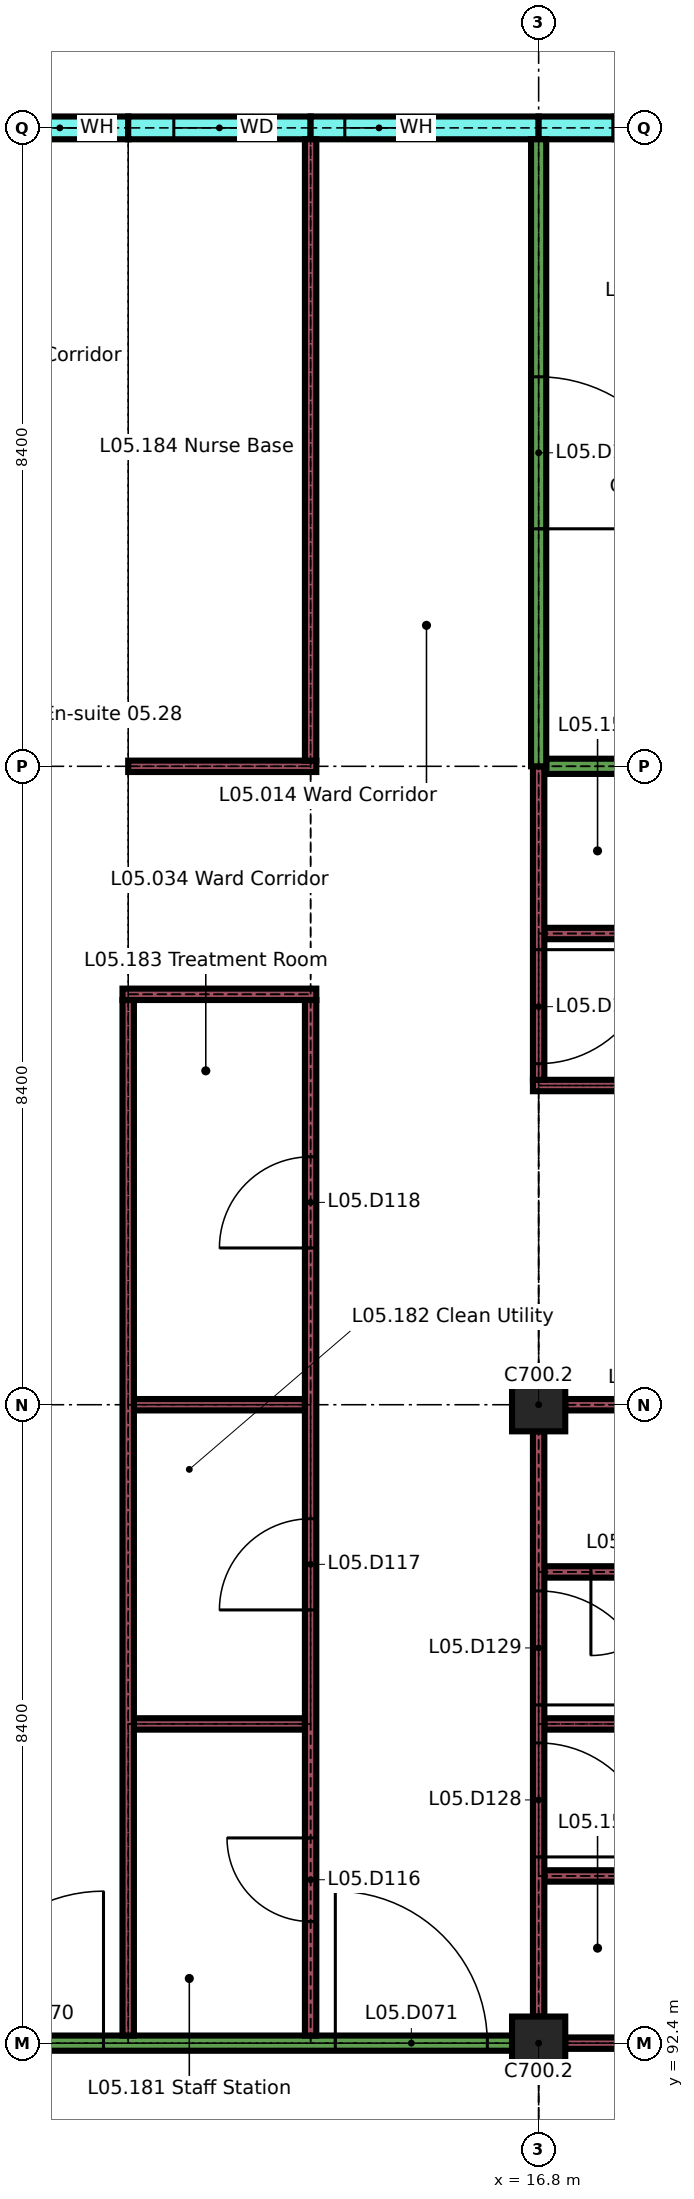
"""IFC4 building model, lengths in metres.
Left out: names, types, materials, properties, quantities, classifications, styles, units other than length and angle.
Written with IfcOpenShell. Run it as: python <this file> out.ifc"""

import sys

from ifc_helpers import new_model, si_unit, direction, frame, frame_2d, origin, origin_2d, place, context, subcontext, project, spatial, rectangle, extrude, element, fill, save


model = new_model("IFC4")
c1 = context("Model", 3, precision=1e-05, world=origin(), true_north=direction((0.0, 1.0)))
c2 = subcontext(c1, "Body", "Model", "MODEL_VIEW")
j1 = project(units=[si_unit("LENGTHUNIT", "METRE"), si_unit("PLANEANGLEUNIT", "RADIAN")], contexts=[c1])
p1 = place(None, origin())
s1 = spatial("IfcSite", under=j1, at=p1, CompositionType="ELEMENT")
p2 = place(p1, origin())
s2 = spatial("IfcBuilding", under=s1, at=p2, CompositionType="ELEMENT")
p3 = place(p2, frame((0.0, 0.0, 22.5)))
s3 = spatial("IfcBuildingStorey", under=s2, at=p3, CompositionType="ELEMENT", Elevation=22.5)
for number, where, z_axis, x_axis in (
    (1, (16.8, 92.4, 0.0), (0.0, 0.0, 1.0), (1.0, 0.0, 0.0)),
    (2, (16.8, 100.8, 0.0), (0.0, 0.0, 1.0), (1.0, 0.0, 0.0)),
):
    element("IfcColumn", number, at=place(p3, frame(where, z_axis=z_axis, x_axis=x_axis)), inside=s3, PredefinedType="COLUMN", context=c2, shape_type="SweptSolid", body=[
        extrude(rectangle(XDim=0.7, YDim=0.7, at=origin_2d()), origin(), (0.0, 0.0, 1.0), 3.26),
    ])
p4 = place(p3, frame((8.75, 117.6, 0.0), z_axis=(0.0, 0.0, 1.0), x_axis=(1.0, 0.0, 0.0)))
e3 = element("IfcWall", 3, at=p4, inside=s3, PredefinedType="SOLIDWALL", context=c2, shape_type="SweptSolid", body=[
    extrude(rectangle(XDim=2.65, YDim=0.3, at=frame_2d((1.325, 0.0))), origin(), (0.0, 0.0, 1.0), 3.26),
])
p5 = place(p4, frame((1.3, 0.0, 0.9)))
e4 = element("IfcOpeningElement", 4, at=p5, cuts=e3, PredefinedType="OPENING", context=c2, shape_type="SweptSolid", body=[
    extrude(rectangle(XDim=0.9, YDim=1.5, at=frame_2d((0.45, 0.75))), frame((0.0, 0.16, 0.0), z_axis=(0.0, -1.0, 0.0), x_axis=(1.0, 0.0, 0.0)), (0.0, 0.0, 1.0), 0.32),
])
p6 = place(p3, frame((11.4, 117.6, 0.0), z_axis=(0.0, 0.0, 1.0), x_axis=(1.0, 0.0, 0.0)))
e5 = element("IfcWall", 5, at=p6, inside=s3, PredefinedType="SOLIDWALL", context=c2, shape_type="SweptSolid", body=[
    extrude(rectangle(XDim=2.4, YDim=0.3, at=frame_2d((1.2, 0.0))), origin(), (0.0, 0.0, 1.0), 3.26),
])
p7 = place(p6, frame((0.6, 0.0, 0.9)))
e6 = element("IfcOpeningElement", 6, at=p7, cuts=e5, PredefinedType="OPENING", context=c2, shape_type="SweptSolid", body=[
    extrude(rectangle(XDim=1.2, YDim=1.5, at=frame_2d((0.6, 0.75))), frame((0.0, 0.16, 0.0), z_axis=(0.0, -1.0, 0.0), x_axis=(1.0, 0.0, 0.0)), (0.0, 0.0, 1.0), 0.32),
])
p8 = place(p3, frame((13.8, 117.6, 0.0), z_axis=(0.0, 0.0, 1.0), x_axis=(1.0, 0.0, 0.0)))
e7 = element("IfcWall", 7, at=p8, inside=s3, PredefinedType="SOLIDWALL", context=c2, shape_type="SweptSolid", body=[
    extrude(rectangle(XDim=3.0, YDim=0.3, at=frame_2d((1.5, 0.0))), origin(), (0.0, 0.0, 1.0), 3.26),
])
p9 = place(p8, frame((0.45, 0.0, 0.9)))
e8 = element("IfcOpeningElement", 8, at=p9, cuts=e7, PredefinedType="OPENING", context=c2, shape_type="SweptSolid", body=[
    extrude(rectangle(XDim=0.9, YDim=1.5, at=frame_2d((0.45, 0.75))), frame((0.0, 0.16, 0.0), z_axis=(0.0, -1.0, 0.0), x_axis=(1.0, 0.0, 0.0)), (0.0, 0.0, 1.0), 0.32),
])
p10 = place(p3, frame((16.8, 117.6, 0.0), z_axis=(0.0, 0.0, 1.0), x_axis=(1.0, 0.0, 0.0)))
e9 = element("IfcWall", 9, at=p10, inside=s3, PredefinedType="SOLIDWALL", context=c2, shape_type="SweptSolid", body=[
    extrude(rectangle(XDim=1.0, YDim=0.3, at=frame_2d((0.5, 0.0))), origin(), (0.0, 0.0, 1.0), 3.26),
])
p11 = place(p3, frame((17.8, 117.6, 0.0), z_axis=(0.0, 0.0, 1.0), x_axis=(1.0, 0.0, 0.0)))
e10 = element("IfcWall", 10, at=p11, inside=s3, PredefinedType="SOLIDWALL", context=c2, shape_type="SweptSolid", body=[
    extrude(rectangle(XDim=2.8, YDim=0.3, at=frame_2d((1.4, 0.0))), origin(), (0.0, 0.0, 1.0), 0.6),
])
p12 = place(p3, frame((8.75, 92.4, 0.0), z_axis=(0.0, 0.0, 1.0), x_axis=(1.0, 0.0, 0.0)))
e11 = element("IfcWall", 11, at=p12, inside=s3, PredefinedType="PARTITIONING", context=c2, shape_type="SweptSolid", body=[
    extrude(rectangle(XDim=7.7, YDim=0.2, at=frame_2d((3.85, 0.0))), origin(), (0.0, 0.0, 1.0), 3.26),
])
p13 = place(p12, frame((0.325, 0.0, 0.0)))
e12 = element("IfcOpeningElement", 12, at=p13, cuts=e11, PredefinedType="OPENING", context=c2, shape_type="SweptSolid", body=[
    extrude(rectangle(XDim=2.0, YDim=2.4, at=frame_2d((1.0, 1.2))), frame((0.0, 0.11, 0.0), z_axis=(0.0, -1.0, 0.0), x_axis=(1.0, 0.0, 0.0)), (0.0, 0.0, 1.0), 0.22),
])
p14 = place(p12, frame((5.375, 0.0, 0.0)))
e13 = element("IfcOpeningElement", 13, at=p14, cuts=e11, PredefinedType="OPENING", context=c2, shape_type="SweptSolid", body=[
    extrude(rectangle(XDim=2.0, YDim=2.4, at=frame_2d((1.0, 1.2))), frame((0.0, 0.11, 0.0), z_axis=(0.0, -1.0, 0.0), x_axis=(1.0, 0.0, 0.0)), (0.0, 0.0, 1.0), 0.22),
])
p15 = place(p3, frame((17.15, 92.4, 0.0), z_axis=(0.0, 0.0, 1.0), x_axis=(1.0, 0.0, 0.0)))
e14 = element("IfcWall", 14, at=p15, inside=s3, PredefinedType="PARTITIONING", context=c2, shape_type="SweptSolid", body=[
    extrude(rectangle(XDim=7.7, YDim=0.15, at=frame_2d((3.85, 0.0))), origin(), (0.0, 0.0, 1.0), 3.26),
])
p16 = place(p3, frame((16.875, 94.6, 0.0), z_axis=(0.0, 0.0, 1.0), x_axis=(1.0, 0.0, 0.0)))
e15 = element("IfcWall", 15, at=p16, inside=s3, PredefinedType="PARTITIONING", context=c2, shape_type="SweptSolid", body=[
    extrude(rectangle(XDim=2.4, YDim=0.15, at=frame_2d((1.2, 0.0))), origin(), (0.0, 0.0, 1.0), 3.26),
])
p17 = place(p3, frame((11.475, 96.6, 0.0), z_axis=(0.0, 0.0, 1.0), x_axis=(1.0, 0.0, 0.0)))
e16 = element("IfcWall", 16, at=p17, inside=s3, PredefinedType="PARTITIONING", context=c2, shape_type="SweptSolid", body=[
    extrude(rectangle(XDim=2.25, YDim=0.15, at=frame_2d((1.125, 0.0))), origin(), (0.0, 0.0, 1.0), 3.26),
])
p18 = place(p3, frame((16.875, 96.6, 0.0), z_axis=(0.0, 0.0, 1.0), x_axis=(1.0, 0.0, 0.0)))
e17 = element("IfcWall", 17, at=p18, inside=s3, PredefinedType="PARTITIONING", context=c2, shape_type="SweptSolid", body=[
    extrude(rectangle(XDim=8.175, YDim=0.15, at=frame_2d((4.087, 0.0))), origin(), (0.0, 0.0, 1.0), 3.26),
])
p19 = place(p3, frame((16.875, 98.6, 0.0), z_axis=(0.0, 0.0, 1.0), x_axis=(1.0, 0.0, 0.0)))
e18 = element("IfcWall", 18, at=p19, inside=s3, PredefinedType="PARTITIONING", context=c2, shape_type="SweptSolid", body=[
    extrude(rectangle(XDim=2.4, YDim=0.15, at=frame_2d((1.2, 0.0))), origin(), (0.0, 0.0, 1.0), 3.26),
])
p20 = place(p19, frame((0.613, 0.0, 0.0)))
e19 = element("IfcOpeningElement", 19, at=p20, cuts=e18, PredefinedType="OPENING", context=c2, shape_type="SweptSolid", body=[
    extrude(rectangle(XDim=1.1, YDim=2.1, at=frame_2d((0.55, 1.05))), frame((0.0, 0.085, 0.0), z_axis=(0.0, -1.0, 0.0), x_axis=(1.0, 0.0, 0.0)), (0.0, 0.0, 1.0), 0.17),
])
p21 = place(p3, frame((11.475, 100.8, 0.0), z_axis=(0.0, 0.0, 1.0), x_axis=(1.0, 0.0, 0.0)))
e20 = element("IfcWall", 20, at=p21, inside=s3, PredefinedType="PARTITIONING", context=c2, shape_type="SweptSolid", body=[
    extrude(rectangle(XDim=2.25, YDim=0.15, at=frame_2d((1.125, 0.0))), origin(), (0.0, 0.0, 1.0), 3.26),
])
p22 = place(p3, frame((17.15, 100.8, 0.0), z_axis=(0.0, 0.0, 1.0), x_axis=(1.0, 0.0, 0.0)))
e21 = element("IfcWall", 21, at=p22, inside=s3, PredefinedType="PARTITIONING", context=c2, shape_type="SweptSolid", body=[
    extrude(rectangle(XDim=7.7, YDim=0.15, at=frame_2d((3.85, 0.0))), origin(), (0.0, 0.0, 1.0), 3.26),
])
p23 = place(p3, frame((16.725, 105.0, 0.0), z_axis=(0.0, 0.0, 1.0), x_axis=(1.0, 0.0, 0.0)))
e22 = element("IfcWall", 22, at=p23, inside=s3, PredefinedType="PARTITIONING", context=c2, shape_type="SweptSolid", body=[
    extrude(rectangle(XDim=8.325, YDim=0.15, at=frame_2d((4.163, 0.0))), origin(), (0.0, 0.0, 1.0), 3.26),
])
p24 = place(p3, frame((11.325, 106.2, 0.0), z_axis=(0.0, 0.0, 1.0), x_axis=(1.0, 0.0, 0.0)))
e23 = element("IfcWall", 23, at=p24, inside=s3, PredefinedType="PARTITIONING", context=c2, shape_type="SweptSolid", body=[
    extrude(rectangle(XDim=2.55, YDim=0.15, at=frame_2d((1.275, 0.0))), origin(), (0.0, 0.0, 1.0), 3.26),
])
p25 = place(p3, frame((16.875, 107.0, 0.0), z_axis=(0.0, 0.0, 1.0), x_axis=(1.0, 0.0, 0.0)))
e24 = element("IfcWall", 24, at=p25, inside=s3, PredefinedType="PARTITIONING", context=c2, shape_type="SweptSolid", body=[
    extrude(rectangle(XDim=2.4, YDim=0.15, at=frame_2d((1.2, 0.0))), origin(), (0.0, 0.0, 1.0), 3.26),
])
p26 = place(p3, frame((11.4, 109.2, 0.0), z_axis=(0.0, 0.0, 1.0), x_axis=(1.0, 0.0, 0.0)))
e25 = element("IfcWall", 25, at=p26, inside=s3, PredefinedType="PARTITIONING", context=c2, shape_type="SweptSolid", body=[
    extrude(rectangle(XDim=2.475, YDim=0.15, at=frame_2d((1.238, 0.0))), origin(), (0.0, 0.0, 1.0), 3.26),
])
p27 = place(p3, frame((16.9, 109.2, 0.0), z_axis=(0.0, 0.0, 1.0), x_axis=(1.0, 0.0, 0.0)))
e26 = element("IfcWall", 26, at=p27, inside=s3, PredefinedType="PARTITIONING", context=c2, shape_type="SweptSolid", body=[
    extrude(rectangle(XDim=4.7, YDim=0.2, at=frame_2d((2.35, 0.0))), origin(), (0.0, 0.0, 1.0), 3.26),
])
p28 = place(p3, frame((11.4, 92.5, 0.0), z_axis=(0.0, 0.0, 1.0), x_axis=(0.0, 1.0, 0.0)))
e27 = element("IfcWall", 27, at=p28, inside=s3, PredefinedType="PARTITIONING", context=c2, shape_type="SweptSolid", body=[
    extrude(rectangle(XDim=13.625, YDim=0.15, at=frame_2d((6.812, 0.0))), origin(), (0.0, 0.0, 1.0), 3.26),
])
p29 = place(p3, frame((13.8, 92.5, 0.0), z_axis=(0.0, 0.0, 1.0), x_axis=(0.0, 1.0, 0.0)))
e28 = element("IfcWall", 28, at=p29, inside=s3, PredefinedType="PARTITIONING", context=c2, shape_type="SweptSolid", body=[
    extrude(rectangle(XDim=13.625, YDim=0.15, at=frame_2d((6.812, 0.0))), origin(), (0.0, 0.0, 1.0), 3.26),
])
p30 = place(p29, frame((1.5, 0.0, 0.0)))
e29 = element("IfcOpeningElement", 29, at=p30, cuts=e28, PredefinedType="OPENING", context=c2, shape_type="SweptSolid", body=[
    extrude(rectangle(XDim=1.1, YDim=2.1, at=frame_2d((0.55, 1.05))), frame((0.0, 0.085, 0.0), z_axis=(0.0, -1.0, 0.0), x_axis=(1.0, 0.0, 0.0)), (0.0, 0.0, 1.0), 0.17),
])
p31 = place(p29, frame((5.6, 0.0, 0.0)))
e30 = element("IfcOpeningElement", 30, at=p31, cuts=e28, PredefinedType="OPENING", context=c2, shape_type="SweptSolid", body=[
    extrude(rectangle(XDim=1.2, YDim=2.1, at=frame_2d((0.6, 1.05))), frame((0.0, 0.085, 0.0), z_axis=(0.0, -1.0, 0.0), x_axis=(1.0, 0.0, 0.0)), (0.0, 0.0, 1.0), 0.17),
])
p32 = place(p29, frame((10.363, 0.0, 0.0)))
e31 = element("IfcOpeningElement", 31, at=p32, cuts=e28, PredefinedType="OPENING", context=c2, shape_type="SweptSolid", body=[
    extrude(rectangle(XDim=1.2, YDim=2.1, at=frame_2d((0.6, 1.05))), frame((0.0, 0.085, 0.0), z_axis=(0.0, -1.0, 0.0), x_axis=(1.0, 0.0, 0.0)), (0.0, 0.0, 1.0), 0.17),
])
p33 = place(p3, frame((13.8, 109.275, 0.0), z_axis=(0.0, 0.0, 1.0), x_axis=(0.0, 1.0, 0.0)))
e32 = element("IfcWall", 32, at=p33, inside=s3, PredefinedType="PARTITIONING", context=c2, shape_type="SweptSolid", body=[
    extrude(rectangle(XDim=8.175, YDim=0.15, at=frame_2d((4.087, 0.0))), origin(), (0.0, 0.0, 1.0), 3.26),
])
p34 = place(p3, frame((16.8, 92.75, 0.0), z_axis=(0.0, 0.0, 1.0), x_axis=(0.0, 1.0, 0.0)))
e33 = element("IfcWall", 33, at=p34, inside=s3, PredefinedType="PARTITIONING", context=c2, shape_type="SweptSolid", body=[
    extrude(rectangle(XDim=7.7, YDim=0.15, at=frame_2d((3.85, 0.0))), origin(), (0.0, 0.0, 1.0), 3.26),
])
p35 = place(p34, frame((2.1, 0.0, 0.0)))
e34 = element("IfcOpeningElement", 34, at=p35, cuts=e33, PredefinedType="OPENING", context=c2, shape_type="SweptSolid", body=[
    extrude(rectangle(XDim=1.5, YDim=2.4, at=frame_2d((0.75, 1.2))), frame((0.0, 0.085, 0.0), z_axis=(0.0, -1.0, 0.0), x_axis=(1.0, 0.0, 0.0)), (0.0, 0.0, 1.0), 0.17),
])
p36 = place(p34, frame((4.1, 0.0, 0.0)))
e35 = element("IfcOpeningElement", 35, at=p36, cuts=e33, PredefinedType="OPENING", context=c2, shape_type="SweptSolid", body=[
    extrude(rectangle(XDim=1.5, YDim=2.4, at=frame_2d((0.75, 1.2))), frame((0.0, 0.085, 0.0), z_axis=(0.0, -1.0, 0.0), x_axis=(1.0, 0.0, 0.0)), (0.0, 0.0, 1.0), 0.17),
])
p37 = place(p3, frame((16.8, 105.075, 0.0), z_axis=(0.0, 0.0, 1.0), x_axis=(0.0, 1.0, 0.0)))
e36 = element("IfcWall", 36, at=p37, inside=s3, PredefinedType="PARTITIONING", context=c2, shape_type="SweptSolid", body=[
    extrude(rectangle(XDim=4.125, YDim=0.15, at=frame_2d((2.062, 0.0))), origin(), (0.0, 0.0, 1.0), 3.26),
])
p38 = place(p37, frame((0.212, 0.0, 0.0)))
e37 = element("IfcOpeningElement", 37, at=p38, cuts=e36, PredefinedType="OPENING", context=c2, shape_type="SweptSolid", body=[
    extrude(rectangle(XDim=1.5, YDim=2.4, at=frame_2d((0.75, 1.2))), frame((0.0, 0.085, 0.0), z_axis=(0.0, -1.0, 0.0), x_axis=(1.0, 0.0, 0.0)), (0.0, 0.0, 1.0), 0.17),
])
p39 = place(p3, frame((16.8, 109.2, 0.0), z_axis=(0.0, 0.0, 1.0), x_axis=(0.0, 1.0, 0.0)))
e38 = element("IfcWall", 38, at=p39, inside=s3, PredefinedType="PARTITIONING", context=c2, shape_type="SweptSolid", body=[
    extrude(rectangle(XDim=8.25, YDim=0.2, at=frame_2d((4.125, 0.0))), origin(), (0.0, 0.0, 1.0), 3.26),
])
p40 = place(p39, frame((3.125, 0.0, 0.0)))
e39 = element("IfcOpeningElement", 39, at=p40, cuts=e38, PredefinedType="OPENING", context=c2, shape_type="SweptSolid", body=[
    extrude(rectangle(XDim=2.0, YDim=2.4, at=frame_2d((1.0, 1.2))), frame((0.0, 0.11, 0.0), z_axis=(0.0, -1.0, 0.0), x_axis=(1.0, 0.0, 0.0)), (0.0, 0.0, 1.0), 0.22),
])
p41 = place(p5, origin())
e40 = element("IfcWindow", 40, at=p41, inside=s3, PartitioningType="SINGLE_PANEL", PredefinedType="WINDOW", context=c2, shape_type="SweptSolid", body=[
    extrude(rectangle(XDim=0.9, YDim=1.5, at=frame_2d((0.45, 0.75))), frame((0.0, 0.03, 0.0), z_axis=(0.0, -1.0, 0.0), x_axis=(1.0, 0.0, 0.0)), (0.0, 0.0, 1.0), 0.06),
])
fill(e4, e40)
p42 = place(p7, origin())
e41 = element("IfcWindow", 41, at=p42, inside=s3, PartitioningType="SINGLE_PANEL", PredefinedType="WINDOW", context=c2, shape_type="SweptSolid", body=[
    extrude(rectangle(XDim=1.2, YDim=1.5, at=frame_2d((0.6, 0.75))), frame((0.0, 0.03, 0.0), z_axis=(0.0, -1.0, 0.0), x_axis=(1.0, 0.0, 0.0)), (0.0, 0.0, 1.0), 0.06),
])
fill(e6, e41)
p43 = place(p9, origin())
e42 = element("IfcWindow", 42, at=p43, inside=s3, PartitioningType="SINGLE_PANEL", PredefinedType="WINDOW", context=c2, shape_type="SweptSolid", body=[
    extrude(rectangle(XDim=0.9, YDim=1.5, at=frame_2d((0.45, 0.75))), frame((0.0, 0.03, 0.0), z_axis=(0.0, -1.0, 0.0), x_axis=(1.0, 0.0, 0.0)), (0.0, 0.0, 1.0), 0.06),
])
fill(e8, e42)
p44 = place(p13, origin())
e43 = element("IfcDoor", 43, at=p44, inside=s3, OperationType="SINGLE_SWING_LEFT", PredefinedType="DOOR", context=c2, shape_type="SweptSolid", body=[
    extrude(rectangle(XDim=2.0, YDim=2.4, at=frame_2d((1.0, 1.2))), frame((0.0, 0.03, 0.0), z_axis=(0.0, -1.0, 0.0), x_axis=(1.0, 0.0, 0.0)), (0.0, 0.0, 1.0), 0.06),
])
fill(e12, e43)
p45 = place(p14, origin())
e44 = element("IfcDoor", 44, at=p45, inside=s3, OperationType="SINGLE_SWING_RIGHT", PredefinedType="DOOR", context=c2, shape_type="SweptSolid", body=[
    extrude(rectangle(XDim=2.0, YDim=2.4, at=frame_2d((1.0, 1.2))), frame((0.0, 0.03, 0.0), z_axis=(0.0, -1.0, 0.0), x_axis=(1.0, 0.0, 0.0)), (0.0, 0.0, 1.0), 0.06),
])
fill(e13, e44)
p46 = place(p20, origin())
e45 = element("IfcDoor", 45, at=p46, inside=s3, OperationType="SINGLE_SWING_LEFT", PredefinedType="DOOR", context=c2, shape_type="SweptSolid", body=[
    extrude(rectangle(XDim=1.1, YDim=2.1, at=frame_2d((0.55, 1.05))), frame((0.0, 0.025, 0.0), z_axis=(0.0, -1.0, 0.0), x_axis=(1.0, 0.0, 0.0)), (0.0, 0.0, 1.0), 0.05),
])
fill(e19, e45)
p47 = place(p30, origin())
e46 = element("IfcDoor", 46, at=p47, inside=s3, OperationType="SINGLE_SWING_LEFT", PredefinedType="DOOR", context=c2, shape_type="SweptSolid", body=[
    extrude(rectangle(XDim=1.1, YDim=2.1, at=frame_2d((0.55, 1.05))), frame((0.0, 0.025, 0.0), z_axis=(0.0, -1.0, 0.0), x_axis=(1.0, 0.0, 0.0)), (0.0, 0.0, 1.0), 0.05),
])
fill(e29, e46)
p48 = place(p31, origin())
e47 = element("IfcDoor", 47, at=p48, inside=s3, OperationType="SINGLE_SWING_RIGHT", PredefinedType="DOOR", context=c2, shape_type="SweptSolid", body=[
    extrude(rectangle(XDim=1.2, YDim=2.1, at=frame_2d((0.6, 1.05))), frame((0.0, 0.025, 0.0), z_axis=(0.0, -1.0, 0.0), x_axis=(1.0, 0.0, 0.0)), (0.0, 0.0, 1.0), 0.05),
])
fill(e30, e47)
p49 = place(p32, origin())
e48 = element("IfcDoor", 48, at=p49, inside=s3, OperationType="SINGLE_SWING_RIGHT", PredefinedType="DOOR", context=c2, shape_type="SweptSolid", body=[
    extrude(rectangle(XDim=1.2, YDim=2.1, at=frame_2d((0.6, 1.05))), frame((0.0, 0.025, 0.0), z_axis=(0.0, -1.0, 0.0), x_axis=(1.0, 0.0, 0.0)), (0.0, 0.0, 1.0), 0.05),
])
fill(e31, e48)
p50 = place(p35, origin())
e49 = element("IfcDoor", 49, at=p50, inside=s3, OperationType="SINGLE_SWING_LEFT", PredefinedType="DOOR", context=c2, shape_type="SweptSolid", body=[
    extrude(rectangle(XDim=1.5, YDim=2.4, at=frame_2d((0.75, 1.2))), frame((0.0, 0.03, 0.0), z_axis=(0.0, -1.0, 0.0), x_axis=(1.0, 0.0, 0.0)), (0.0, 0.0, 1.0), 0.06),
])
fill(e34, e49)
p51 = place(p36, origin())
e50 = element("IfcDoor", 50, at=p51, inside=s3, OperationType="SINGLE_SWING_LEFT", PredefinedType="DOOR", context=c2, shape_type="SweptSolid", body=[
    extrude(rectangle(XDim=1.5, YDim=2.4, at=frame_2d((0.75, 1.2))), frame((0.0, 0.03, 0.0), z_axis=(0.0, -1.0, 0.0), x_axis=(1.0, 0.0, 0.0)), (0.0, 0.0, 1.0), 0.06),
])
fill(e35, e50)
p52 = place(p38, origin())
e51 = element("IfcDoor", 51, at=p52, inside=s3, OperationType="SINGLE_SWING_RIGHT", PredefinedType="DOOR", context=c2, shape_type="SweptSolid", body=[
    extrude(rectangle(XDim=1.5, YDim=2.4, at=frame_2d((0.75, 1.2))), frame((0.0, 0.03, 0.0), z_axis=(0.0, -1.0, 0.0), x_axis=(1.0, 0.0, 0.0)), (0.0, 0.0, 1.0), 0.06),
])
fill(e37, e51)
p53 = place(p40, origin())
e52 = element("IfcDoor", 52, at=p53, inside=s3, OperationType="SINGLE_SWING_LEFT", PredefinedType="DOOR", context=c2, shape_type="SweptSolid", body=[
    extrude(rectangle(XDim=2.0, YDim=2.4, at=frame_2d((1.0, 1.2))), frame((0.0, 0.03, 0.0), z_axis=(0.0, -1.0, 0.0), x_axis=(1.0, 0.0, 0.0)), (0.0, 0.0, 1.0), 0.06),
])
fill(e39, e52)
save(model, sys.argv[1])
